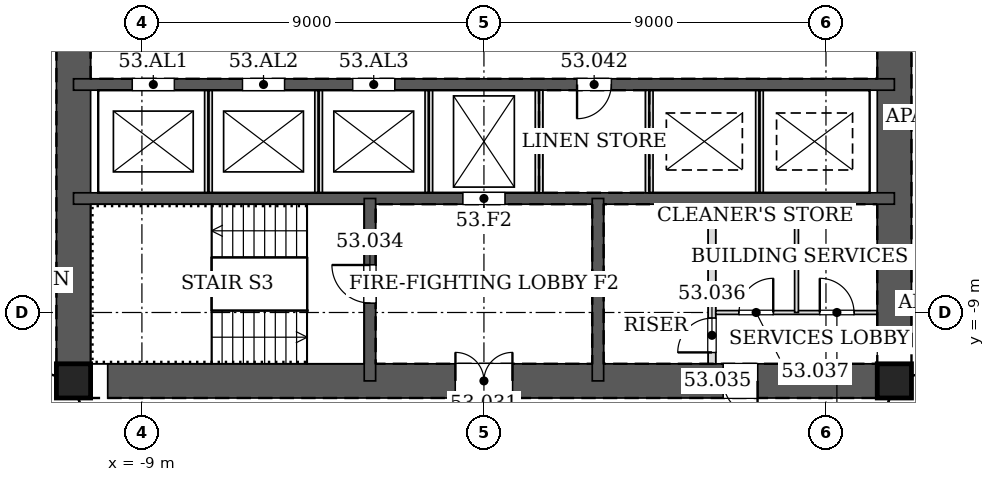
"""IFC4 building model, lengths in metres.
Left out: names, types, materials, properties, quantities, classifications, styles, units other than length and angle.
Written with IfcOpenShell. Run it as: python <this file> out.ifc"""

import sys

from ifc_helpers import new_model, si_unit, direction, frame, frame_2d, origin, origin_2d, place, context, subcontext, project, spatial, rectangle, hollow_rectangle, extrude, element, fill, save


model = new_model("IFC4")
c1 = context("Model", 3, precision=1e-05, world=origin(), true_north=direction((0.0, 1.0)))
c2 = subcontext(c1, "Body", "Model", "MODEL_VIEW")
j1 = project(units=[si_unit("LENGTHUNIT", "METRE"), si_unit("PLANEANGLEUNIT", "RADIAN")], contexts=[c1])
p1 = place(None, origin())
s1 = spatial("IfcSite", under=j1, at=p1, CompositionType="ELEMENT")
p2 = place(p1, origin())
s2 = spatial("IfcBuilding", under=s1, at=p2, CompositionType="ELEMENT")
p3 = place(p2, frame((0.0, 0.0, 227.8)))
s3 = spatial("IfcBuildingStorey", under=s2, at=p3, CompositionType="ELEMENT", Elevation=227.8)
for number, where, z_axis, x_axis in (
    (1, (-10.8, -10.8, 0.0), (0.0, 0.0, 1.0), (1.0, 0.0, 0.0)),
    (2, (10.8, -10.8, 0.0), (0.0, 0.0, 1.0), (1.0, 0.0, 0.0)),
):
    element("IfcColumn", number, at=place(p3, frame(where, z_axis=z_axis, x_axis=x_axis)), inside=s3, PredefinedType="COLUMN", context=c2, shape_type="SweptSolid", body=[
        extrude(hollow_rectangle(XDim=0.9, YDim=0.9, WallThickness=0.05, at=origin_2d()), origin(), (0.0, 0.0, 1.0), 3.4),
    ])
p4 = place(p3, frame((-10.8, -10.8, 0.0), z_axis=(0.0, 0.0, 1.0), x_axis=(1.0, 0.0, 0.0)))
e3 = element("IfcWall", 3, at=p4, inside=s3, PredefinedType="SOLIDWALL", context=c2, shape_type="SweptSolid", body=[
    extrude(rectangle(XDim=21.6, YDim=0.9, at=frame_2d((10.8, 0.0))), origin(), (0.0, 0.0, 1.0), 3.4),
])
p5 = place(p4, frame((10.05, 0.0, 0.0)))
e4 = element("IfcOpeningElement", 4, at=p5, cuts=e3, PredefinedType="OPENING", context=c2, shape_type="SweptSolid", body=[
    extrude(rectangle(XDim=1.5, YDim=2.1, at=frame_2d((0.75, 1.05))), frame((0.0, 0.46, 0.0), z_axis=(0.0, -1.0, 0.0), x_axis=(1.0, 0.0, 0.0)), (0.0, 0.0, 1.0), 0.92),
])
p6 = place(p4, frame((17.1, 0.0, 0.0)))
e5 = element("IfcOpeningElement", 5, at=p6, cuts=e3, PredefinedType="OPENING", context=c2, shape_type="SweptSolid", body=[
    extrude(rectangle(XDim=0.9, YDim=2.1, at=frame_2d((0.45, 1.05))), frame((0.0, 0.46, 0.0), z_axis=(0.0, -1.0, 0.0), x_axis=(1.0, 0.0, 0.0)), (0.0, 0.0, 1.0), 0.92),
])
p7 = place(p3, frame((10.8, -10.8, 0.0), z_axis=(0.0, 0.0, 1.0), x_axis=(0.0, 1.0, 0.0)))
e6 = element("IfcWall", 6, at=p7, inside=s3, PredefinedType="SOLIDWALL", context=c2, shape_type="SweptSolid", body=[
    extrude(rectangle(XDim=21.6, YDim=0.9, at=frame_2d((10.8, 0.0))), origin(), (0.0, 0.0, 1.0), 3.4),
])
p8 = place(p7, frame((11.7, 0.0, 0.0)))
e7 = element("IfcOpeningElement", 7, at=p8, cuts=e6, PredefinedType="OPENING", context=c2, shape_type="SweptSolid", body=[
    extrude(rectangle(XDim=1.2, YDim=2.1, at=frame_2d((0.6, 1.05))), frame((0.0, 0.46, 0.0), z_axis=(0.0, -1.0, 0.0), x_axis=(1.0, 0.0, 0.0)), (0.0, 0.0, 1.0), 0.92),
])
p9 = place(p7, frame((8.7, 0.0, 0.0)))
e8 = element("IfcOpeningElement", 8, at=p9, cuts=e6, PredefinedType="OPENING", context=c2, shape_type="SweptSolid", body=[
    extrude(rectangle(XDim=1.2, YDim=2.1, at=frame_2d((0.6, 1.05))), frame((0.0, 0.46, 0.0), z_axis=(0.0, -1.0, 0.0), x_axis=(1.0, 0.0, 0.0)), (0.0, 0.0, 1.0), 0.92),
])
p10 = place(p3, frame((-10.8, 10.8, 0.0), z_axis=(0.0, 0.0, 1.0), x_axis=(0.0, -1.0, 0.0)))
e9 = element("IfcWall", 9, at=p10, inside=s3, PredefinedType="SOLIDWALL", context=c2, shape_type="SweptSolid", body=[
    extrude(rectangle(XDim=21.6, YDim=0.9, at=frame_2d((10.8, 0.0))), origin(), (0.0, 0.0, 1.0), 3.4),
])
p11 = place(p10, frame((8.7, 0.0, 0.0)))
e10 = element("IfcOpeningElement", 10, at=p11, cuts=e9, PredefinedType="OPENING", context=c2, shape_type="SweptSolid", body=[
    extrude(rectangle(XDim=1.2, YDim=2.1, at=frame_2d((0.6, 1.05))), frame((0.0, 0.46, 0.0), z_axis=(0.0, -1.0, 0.0), x_axis=(1.0, 0.0, 0.0)), (0.0, 0.0, 1.0), 0.92),
])
p12 = place(p10, frame((11.7, 0.0, 0.0)))
e11 = element("IfcOpeningElement", 11, at=p12, cuts=e9, PredefinedType="OPENING", context=c2, shape_type="SweptSolid", body=[
    extrude(rectangle(XDim=1.2, YDim=2.1, at=frame_2d((0.6, 1.05))), frame((0.0, 0.46, 0.0), z_axis=(0.0, -1.0, 0.0), x_axis=(1.0, 0.0, 0.0)), (0.0, 0.0, 1.0), 0.92),
])
p13 = place(p3, frame((-10.8, -3.0, 0.0), z_axis=(0.0, 0.0, 1.0), x_axis=(1.0, 0.0, 0.0)))
e12 = element("IfcWall", 12, at=p13, inside=s3, PredefinedType="SOLIDWALL", context=c2, shape_type="SweptSolid", body=[
    extrude(rectangle(XDim=21.6, YDim=0.3, at=frame_2d((10.8, 0.0))), origin(), (0.0, 0.0, 1.0), 3.4),
])
p14 = place(p13, frame((13.25, 0.0, 0.0)))
e13 = element("IfcOpeningElement", 13, at=p14, cuts=e12, PredefinedType="OPENING", context=c2, shape_type="SweptSolid", body=[
    extrude(rectangle(XDim=0.9, YDim=2.1, at=frame_2d((0.45, 1.05))), frame((0.0, 0.16, 0.0), z_axis=(0.0, -1.0, 0.0), x_axis=(1.0, 0.0, 0.0)), (0.0, 0.0, 1.0), 0.32),
])
p15 = place(p13, frame((1.55, 0.0, 0.0)))
e14 = element("IfcOpeningElement", 14, at=p15, cuts=e12, PredefinedType="OPENING", context=c2, shape_type="SweptSolid", body=[
    extrude(rectangle(XDim=1.1, YDim=2.1, at=frame_2d((0.55, 1.05))), frame((0.0, 0.16, 0.0), z_axis=(0.0, -1.0, 0.0), x_axis=(1.0, 0.0, 0.0)), (0.0, 0.0, 1.0), 0.32),
])
p16 = place(p13, frame((4.45, 0.0, 0.0)))
e15 = element("IfcOpeningElement", 15, at=p16, cuts=e12, PredefinedType="OPENING", context=c2, shape_type="SweptSolid", body=[
    extrude(rectangle(XDim=1.1, YDim=2.1, at=frame_2d((0.55, 1.05))), frame((0.0, 0.16, 0.0), z_axis=(0.0, -1.0, 0.0), x_axis=(1.0, 0.0, 0.0)), (0.0, 0.0, 1.0), 0.32),
])
p17 = place(p13, frame((7.35, 0.0, 0.0)))
e16 = element("IfcOpeningElement", 16, at=p17, cuts=e12, PredefinedType="OPENING", context=c2, shape_type="SweptSolid", body=[
    extrude(rectangle(XDim=1.1, YDim=2.1, at=frame_2d((0.55, 1.05))), frame((0.0, 0.16, 0.0), z_axis=(0.0, -1.0, 0.0), x_axis=(1.0, 0.0, 0.0)), (0.0, 0.0, 1.0), 0.32),
])
p18 = place(p3, frame((-10.8, -6.0, 0.0), z_axis=(0.0, 0.0, 1.0), x_axis=(1.0, 0.0, 0.0)))
e17 = element("IfcWall", 17, at=p18, inside=s3, PredefinedType="SOLIDWALL", context=c2, shape_type="SweptSolid", body=[
    extrude(rectangle(XDim=21.6, YDim=0.3, at=frame_2d((10.8, 0.0))), origin(), (0.0, 0.0, 1.0), 3.4),
])
p19 = place(p18, frame((10.25, 0.0, 0.0)))
e18 = element("IfcOpeningElement", 18, at=p19, cuts=e17, PredefinedType="OPENING", context=c2, shape_type="SweptSolid", body=[
    extrude(rectangle(XDim=1.1, YDim=2.1, at=frame_2d((0.55, 1.05))), frame((0.0, 0.16, 0.0), z_axis=(0.0, -1.0, 0.0), x_axis=(1.0, 0.0, 0.0)), (0.0, 0.0, 1.0), 0.32),
])
p20 = place(p3, frame((-3.0, -6.0, 0.0), z_axis=(0.0, 0.0, 1.0), x_axis=(0.0, -1.0, 0.0)))
e19 = element("IfcWall", 19, at=p20, inside=s3, PredefinedType="SOLIDWALL", context=c2, shape_type="SweptSolid", body=[
    extrude(rectangle(XDim=4.8, YDim=0.3, at=frame_2d((2.4, 0.0))), origin(), (0.0, 0.0, 1.0), 3.4),
])
p21 = place(p20, frame((1.75, 0.0, 0.0)))
e20 = element("IfcOpeningElement", 20, at=p21, cuts=e19, PredefinedType="OPENING", context=c2, shape_type="SweptSolid", body=[
    extrude(rectangle(XDim=1.0, YDim=2.1, at=frame_2d((0.5, 1.05))), frame((0.0, 0.16, 0.0), z_axis=(0.0, -1.0, 0.0), x_axis=(1.0, 0.0, 0.0)), (0.0, 0.0, 1.0), 0.32),
])
p22 = place(p3, frame((3.0, -6.0, 0.0), z_axis=(0.0, 0.0, 1.0), x_axis=(0.0, -1.0, 0.0)))
e21 = element("IfcWall", 21, at=p22, inside=s3, PredefinedType="SOLIDWALL", context=c2, shape_type="SweptSolid", body=[
    extrude(rectangle(XDim=4.8, YDim=0.3, at=frame_2d((2.4, 0.0))), origin(), (0.0, 0.0, 1.0), 3.4),
])
for number, where, z_axis, x_axis in (
    (22, (-7.25, -5.85, 0.0), (0.0, 0.0, 1.0), (0.0, 1.0, 0.0)),
    (23, (-4.35, -5.85, 0.0), (0.0, 0.0, 1.0), (0.0, 1.0, 0.0)),
    (24, (-1.45, -5.85, 0.0), (0.0, 0.0, 1.0), (0.0, 1.0, 0.0)),
):
    element("IfcWall", number, at=place(p3, frame(where, z_axis=z_axis, x_axis=x_axis)), inside=s3, PredefinedType="PARTITIONING", context=c2, shape_type="SweptSolid", body=[
        extrude(rectangle(XDim=2.7, YDim=0.2, at=frame_2d((1.35, 0.0))), origin(), (0.0, 0.0, 1.0), 3.4),
    ])
for number, where, z_axis, x_axis in (
    (25, (1.45, -5.85, 0.0), (0.0, 0.0, 1.0), (0.0, 1.0, 0.0)),
    (26, (4.35, -5.85, 0.0), (0.0, 0.0, 1.0), (0.0, 1.0, 0.0)),
):
    element("IfcWall", number, at=place(p3, frame(where, z_axis=z_axis, x_axis=x_axis)), inside=s3, PredefinedType="PARTITIONING", context=c2, shape_type="SweptSolid", body=[
        extrude(rectangle(XDim=2.7, YDim=0.2, at=frame_2d((1.35, 0.0))), origin(), (0.0, 0.0, 1.0), 3.2),
    ])
p23 = place(p3, frame((7.25, -5.85, 0.0), z_axis=(0.0, 0.0, 1.0), x_axis=(0.0, 1.0, 0.0)))
e27 = element("IfcWall", 27, at=p23, inside=s3, PredefinedType="PARTITIONING", context=c2, shape_type="SweptSolid", body=[
    extrude(rectangle(XDim=2.7, YDim=0.2, at=frame_2d((1.35, 0.0))), origin(), (0.0, 0.0, 1.0), 3.4),
])
p24 = place(p3, frame((6.0, -10.35, 0.0), z_axis=(0.0, 0.0, 1.0), x_axis=(0.0, 1.0, 0.0)))
e28 = element("IfcWall", 28, at=p24, inside=s3, PredefinedType="PARTITIONING", context=c2, shape_type="SweptSolid", body=[
    extrude(rectangle(XDim=4.2, YDim=0.2, at=frame_2d((2.1, 0.0))), origin(), (0.0, 0.0, 1.0), 3.2),
])
p25 = place(p24, frame((0.3, 0.0, 0.0)))
e29 = element("IfcOpeningElement", 29, at=p25, cuts=e28, PredefinedType="OPENING", context=c2, shape_type="SweptSolid", body=[
    extrude(rectangle(XDim=0.9, YDim=2.1, at=frame_2d((0.45, 1.05))), frame((0.0, 0.11, 0.0), z_axis=(0.0, -1.0, 0.0), x_axis=(1.0, 0.0, 0.0)), (0.0, 0.0, 1.0), 0.22),
])
p26 = place(p3, frame((6.1, -9.0, 0.0), z_axis=(0.0, 0.0, 1.0), x_axis=(1.0, 0.0, 0.0)))
e30 = element("IfcWall", 30, at=p26, inside=s3, PredefinedType="PARTITIONING", context=c2, shape_type="SweptSolid", body=[
    extrude(rectangle(XDim=4.25, YDim=0.1, at=frame_2d((2.125, 0.0))), origin(), (0.0, 0.0, 1.0), 3.2),
])
p27 = place(p26, frame((0.613, 0.0, 0.0)))
e31 = element("IfcOpeningElement", 31, at=p27, cuts=e30, PredefinedType="OPENING", context=c2, shape_type="SweptSolid", body=[
    extrude(rectangle(XDim=0.9, YDim=2.1, at=frame_2d((0.45, 1.05))), frame((0.0, 0.06, 0.0), z_axis=(0.0, -1.0, 0.0), x_axis=(1.0, 0.0, 0.0)), (0.0, 0.0, 1.0), 0.12),
])
p28 = place(p26, frame((2.738, 0.0, 0.0)))
e32 = element("IfcOpeningElement", 32, at=p28, cuts=e30, PredefinedType="OPENING", context=c2, shape_type="SweptSolid", body=[
    extrude(rectangle(XDim=0.9, YDim=2.1, at=frame_2d((0.45, 1.05))), frame((0.0, 0.06, 0.0), z_axis=(0.0, -1.0, 0.0), x_axis=(1.0, 0.0, 0.0)), (0.0, 0.0, 1.0), 0.12),
])
p29 = place(p3, frame((8.225, -9.0, 0.0), z_axis=(0.0, 0.0, 1.0), x_axis=(0.0, 1.0, 0.0)))
e33 = element("IfcWall", 33, at=p29, inside=s3, PredefinedType="PARTITIONING", context=c2, shape_type="SweptSolid", body=[
    extrude(rectangle(XDim=2.85, YDim=0.1, at=frame_2d((1.425, 0.0))), origin(), (0.0, 0.0, 1.0), 3.2),
])
p30 = place(p5, origin())
e34 = element("IfcDoor", 34, at=p30, inside=s3, OperationType="DOUBLE_DOOR_SINGLE_SWING", PredefinedType="DOOR", context=c2, shape_type="SweptSolid", body=[
    extrude(rectangle(XDim=1.5, YDim=2.1, at=frame_2d((0.75, 1.05))), frame((0.0, 0.025, 0.0), z_axis=(0.0, -1.0, 0.0), x_axis=(1.0, 0.0, 0.0)), (0.0, 0.0, 1.0), 0.05),
])
fill(e4, e34)
p31 = place(p21, frame((1.0, 0.0, 0.0), z_axis=(0.0, 0.0, 1.0), x_axis=(-1.0, 0.0, 0.0)))
e35 = element("IfcDoor", 35, at=p31, inside=s3, OperationType="SINGLE_SWING_RIGHT", PredefinedType="DOOR", context=c2, shape_type="SweptSolid", body=[
    extrude(rectangle(XDim=1.0, YDim=2.1, at=frame_2d((0.5, 1.05))), frame((0.0, 0.025, 0.0), z_axis=(0.0, -1.0, 0.0), x_axis=(1.0, 0.0, 0.0)), (0.0, 0.0, 1.0), 0.05),
])
fill(e20, e35)
p32 = place(p6, frame((0.9, 0.0, 0.0), z_axis=(0.0, 0.0, 1.0), x_axis=(-1.0, 0.0, 0.0)))
e36 = element("IfcDoor", 36, at=p32, inside=s3, OperationType="SINGLE_SWING_LEFT", PredefinedType="DOOR", context=c2, shape_type="SweptSolid", body=[
    extrude(rectangle(XDim=0.9, YDim=2.1, at=frame_2d((0.45, 1.05))), frame((0.0, 0.025, 0.0), z_axis=(0.0, -1.0, 0.0), x_axis=(1.0, 0.0, 0.0)), (0.0, 0.0, 1.0), 0.05),
])
fill(e5, e36)
p33 = place(p25, origin())
e37 = element("IfcDoor", 37, at=p33, inside=s3, OperationType="SINGLE_SWING_LEFT", PredefinedType="DOOR", context=c2, shape_type="SweptSolid", body=[
    extrude(rectangle(XDim=0.9, YDim=2.1, at=frame_2d((0.45, 1.05))), frame((0.0, 0.025, 0.0), z_axis=(0.0, -1.0, 0.0), x_axis=(1.0, 0.0, 0.0)), (0.0, 0.0, 1.0), 0.05),
])
fill(e29, e37)
p34 = place(p27, origin())
e38 = element("IfcDoor", 38, at=p34, inside=s3, OperationType="SINGLE_SWING_RIGHT", PredefinedType="DOOR", context=c2, shape_type="SweptSolid", body=[
    extrude(rectangle(XDim=0.9, YDim=2.1, at=frame_2d((0.45, 1.05))), frame((0.0, 0.025, 0.0), z_axis=(0.0, -1.0, 0.0), x_axis=(1.0, 0.0, 0.0)), (0.0, 0.0, 1.0), 0.05),
])
fill(e31, e38)
p35 = place(p28, origin())
e39 = element("IfcDoor", 39, at=p35, inside=s3, OperationType="SINGLE_SWING_LEFT", PredefinedType="DOOR", context=c2, shape_type="SweptSolid", body=[
    extrude(rectangle(XDim=0.9, YDim=2.1, at=frame_2d((0.45, 1.05))), frame((0.0, 0.025, 0.0), z_axis=(0.0, -1.0, 0.0), x_axis=(1.0, 0.0, 0.0)), (0.0, 0.0, 1.0), 0.05),
])
fill(e32, e39)
p36 = place(p14, frame((0.9, 0.0, 0.0), z_axis=(0.0, 0.0, 1.0), x_axis=(-1.0, 0.0, 0.0)))
e40 = element("IfcDoor", 40, at=p36, inside=s3, OperationType="SINGLE_SWING_RIGHT", PredefinedType="DOOR", context=c2, shape_type="SweptSolid", body=[
    extrude(rectangle(XDim=0.9, YDim=2.1, at=frame_2d((0.45, 1.05))), frame((0.0, 0.025, 0.0), z_axis=(0.0, -1.0, 0.0), x_axis=(1.0, 0.0, 0.0)), (0.0, 0.0, 1.0), 0.05),
])
fill(e13, e40)
p37 = place(p19, origin())
e41 = element("IfcDoor", 41, at=p37, inside=s3, OperationType="DOUBLE_DOOR_SLIDING", PredefinedType="DOOR", context=c2, shape_type="SweptSolid", body=[
    extrude(rectangle(XDim=1.1, YDim=2.1, at=frame_2d((0.55, 1.05))), frame((0.0, 0.025, 0.0), z_axis=(0.0, -1.0, 0.0), x_axis=(1.0, 0.0, 0.0)), (0.0, 0.0, 1.0), 0.05),
])
fill(e18, e41)
p38 = place(p15, origin())
e42 = element("IfcDoor", 42, at=p38, inside=s3, OperationType="DOUBLE_DOOR_SLIDING", PredefinedType="DOOR", context=c2, shape_type="SweptSolid", body=[
    extrude(rectangle(XDim=1.1, YDim=2.1, at=frame_2d((0.55, 1.05))), frame((0.0, 0.025, 0.0), z_axis=(0.0, -1.0, 0.0), x_axis=(1.0, 0.0, 0.0)), (0.0, 0.0, 1.0), 0.05),
])
fill(e14, e42)
p39 = place(p16, origin())
e43 = element("IfcDoor", 43, at=p39, inside=s3, OperationType="DOUBLE_DOOR_SLIDING", PredefinedType="DOOR", context=c2, shape_type="SweptSolid", body=[
    extrude(rectangle(XDim=1.1, YDim=2.1, at=frame_2d((0.55, 1.05))), frame((0.0, 0.025, 0.0), z_axis=(0.0, -1.0, 0.0), x_axis=(1.0, 0.0, 0.0)), (0.0, 0.0, 1.0), 0.05),
])
fill(e15, e43)
p40 = place(p17, origin())
e44 = element("IfcDoor", 44, at=p40, inside=s3, OperationType="DOUBLE_DOOR_SLIDING", PredefinedType="DOOR", context=c2, shape_type="SweptSolid", body=[
    extrude(rectangle(XDim=1.1, YDim=2.1, at=frame_2d((0.55, 1.05))), frame((0.0, 0.025, 0.0), z_axis=(0.0, -1.0, 0.0), x_axis=(1.0, 0.0, 0.0)), (0.0, 0.0, 1.0), 0.05),
])
fill(e16, e44)
save(model, sys.argv[1])
